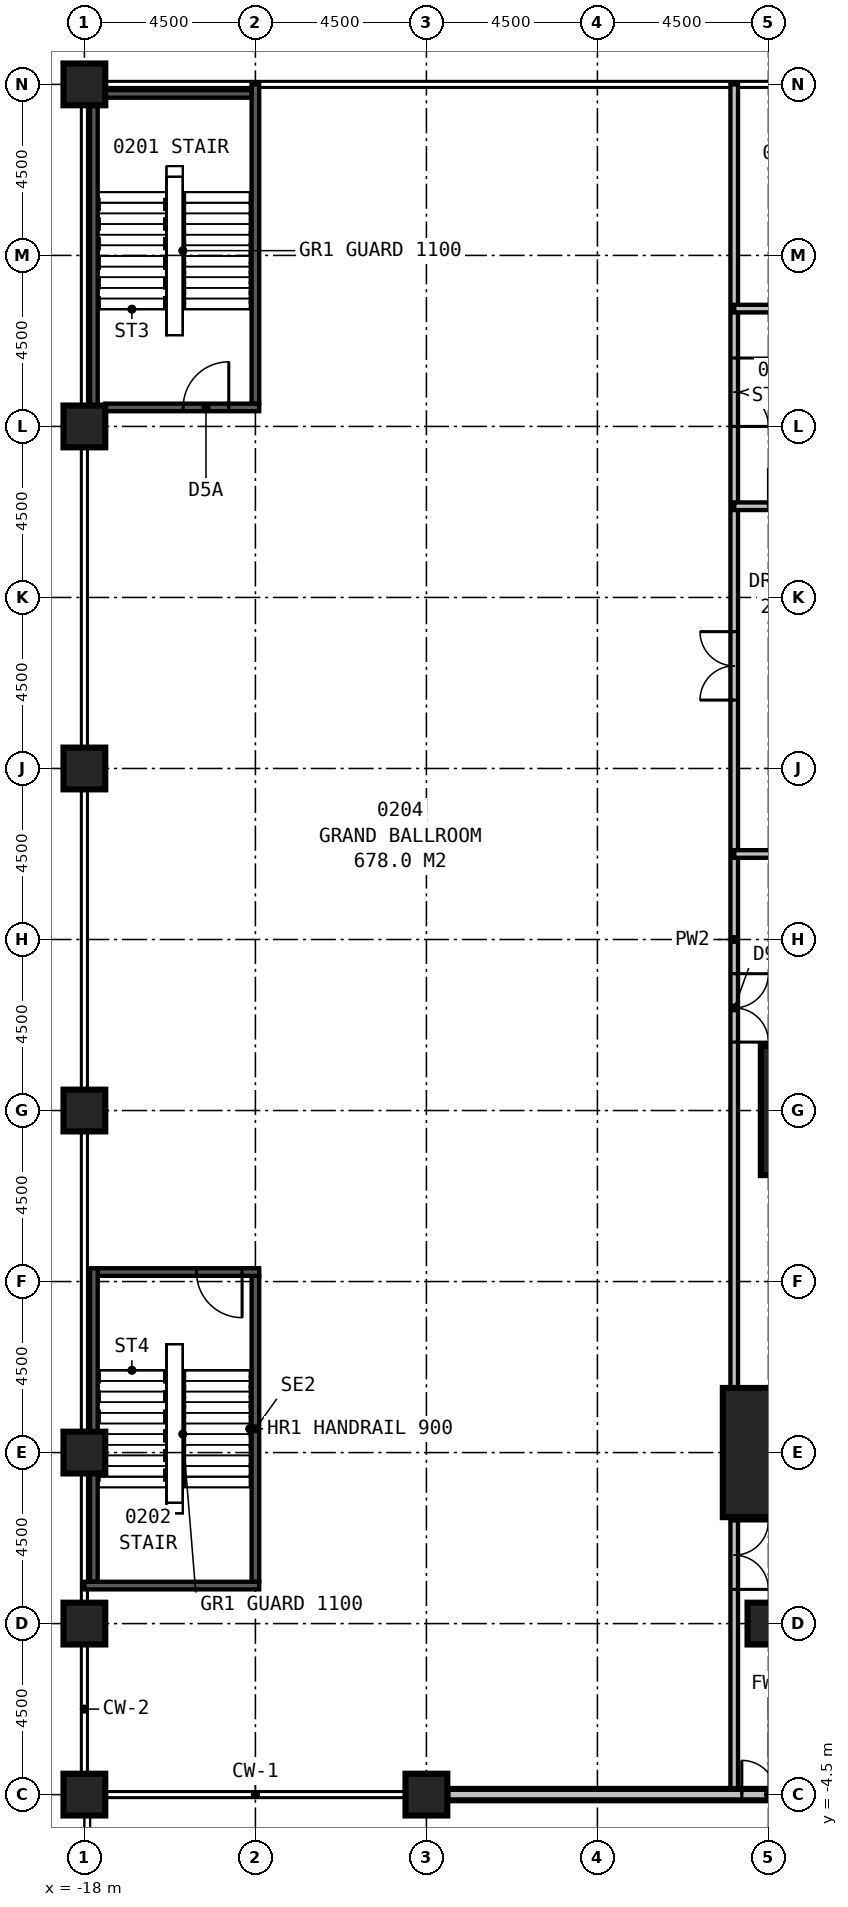
"""IFC4 building model, lengths in metres.
Left out: names, types, materials, properties, quantities, classifications, styles, units other than length and angle.
Written with IfcOpenShell. Run it as: python <this file> out.ifc"""

import sys

from ifc_helpers import new_model, si_unit, direction, frame, frame_2d, origin, origin_2d, place, context, subcontext, project, spatial, rectangle, extrude, element, fill, save


model = new_model("IFC4")
c1 = context("Model", 3, precision=1e-05, world=origin(), true_north=direction((0.0, 1.0)))
c2 = subcontext(c1, "Body", "Model", "MODEL_VIEW")
j1 = project(units=[si_unit("LENGTHUNIT", "METRE"), si_unit("PLANEANGLEUNIT", "RADIAN")], contexts=[c1])
p1 = place(None, origin())
s1 = spatial("IfcSite", under=j1, at=p1, CompositionType="ELEMENT")
p2 = place(p1, origin())
s2 = spatial("IfcBuilding", under=s1, at=p2, CompositionType="ELEMENT")
p3 = place(p2, frame((0.0, 0.0, 11.0)))
s3 = spatial("IfcBuildingStorey", under=s2, at=p3, CompositionType="ELEMENT", Elevation=11.0)
for number, where, z_axis, x_axis in (
    (1, (0.5, 4.5, 0.0), (0.0, 0.0, 1.0), (1.0, 0.0, 0.0)),
    (2, (1.5, 13.5, 0.0), (0.0, 0.0, 1.0), (1.0, 0.0, 0.0)),
):
    element("IfcColumn", number, at=place(p3, frame(where, z_axis=z_axis, x_axis=x_axis)), inside=s3, PredefinedType="COLUMN", context=c2, shape_type="SweptSolid", body=[
        extrude(rectangle(XDim=3.4, YDim=3.4, at=origin_2d()), origin(), (0.0, 0.0, 1.0), 8.0),
    ])
for number, where, z_axis, x_axis in (
    (3, (-18.0, -4.5, 0.0), (0.0, 0.0, 1.0), (1.0, 0.0, 0.0)),
    (4, (-18.0, 4.5, 0.0), (0.0, 0.0, 1.0), (1.0, 0.0, 0.0)),
    (5, (-18.0, 13.5, 0.0), (0.0, 0.0, 1.0), (1.0, 0.0, 0.0)),
    (6, (-18.0, 22.5, 0.0), (0.0, 0.0, 1.0), (1.0, 0.0, 0.0)),
    (7, (-18.0, 31.5, 0.0), (0.0, 0.0, 1.0), (1.0, 0.0, 0.0)),
    (8, (-18.0, 40.5, 0.0), (0.0, 0.0, 1.0), (1.0, 0.0, 0.0)),
    (9, (-18.0, 0.0, 0.0), (0.0, 0.0, 1.0), (1.0, 0.0, 0.0)),
    (10, (0.0, 0.0, 0.0), (0.0, 0.0, 1.0), (1.0, 0.0, 0.0)),
    (11, (-9.0, -4.5, 0.0), (0.0, 0.0, 1.0), (1.0, 0.0, 0.0)),
):
    element("IfcColumn", number, at=place(p3, frame(where, z_axis=z_axis, x_axis=x_axis)), inside=s3, PredefinedType="COLUMN", context=c2, shape_type="SweptSolid", body=[
        extrude(rectangle(XDim=1.1, YDim=1.1, at=origin_2d()), origin(), (0.0, 0.0, 1.0), 8.0),
    ])
p4 = place(p3, frame((-8.45, -4.5, 0.0), z_axis=(0.0, 0.0, 1.0), x_axis=(1.0, 0.0, 0.0)))
e12 = element("IfcWall", 12, at=p4, inside=s3, PredefinedType="STANDARD", context=c2, shape_type="SweptSolid", body=[
    extrude(rectangle(XDim=16.9, YDim=0.3, at=frame_2d((8.45, 0.0))), origin(), (0.0, 0.0, 1.0), 6.2),
])
p5 = place(p4, frame((7.75, 0.0, 0.0)))
e13 = element("IfcOpeningElement", 13, at=p5, cuts=e12, PredefinedType="OPENING", context=c2, shape_type="SweptSolid", body=[
    extrude(rectangle(XDim=1.8, YDim=2.4, at=frame_2d((0.9, 1.2))), frame((0.0, 0.16, 0.0), z_axis=(0.0, -1.0, 0.0), x_axis=(1.0, 0.0, 0.0)), (0.0, 0.0, 1.0), 0.32),
])
p6 = place(p3, frame((-17.45, 32.0, 0.0), z_axis=(0.0, 0.0, 1.0), x_axis=(1.0, 0.0, 0.0)))
e14 = element("IfcWall", 14, at=p6, inside=s3, PredefinedType="SOLIDWALL", context=c2, shape_type="SweptSolid", body=[
    extrude(rectangle(XDim=4.05, YDim=0.2, at=frame_2d((2.025, 0.0))), origin(), (0.0, 0.0, 1.0), 7.7),
])
p7 = place(p6, frame((2.05, 0.0, 0.0)))
e15 = element("IfcOpeningElement", 15, at=p7, cuts=e14, PredefinedType="OPENING", context=c2, shape_type="SweptSolid", body=[
    extrude(rectangle(XDim=1.2, YDim=2.1, at=frame_2d((0.6, 1.05))), frame((0.0, 0.11, 0.0), z_axis=(0.0, -1.0, 0.0), x_axis=(1.0, 0.0, 0.0)), (0.0, 0.0, 1.0), 0.22),
])
p8 = place(p3, frame((-13.5, 32.1, 0.0), z_axis=(0.0, 0.0, 1.0), x_axis=(0.0, 1.0, 0.0)))
e16 = element("IfcWall", 16, at=p8, inside=s3, PredefinedType="SOLIDWALL", context=c2, shape_type="SweptSolid", body=[
    extrude(rectangle(XDim=8.4, YDim=0.2, at=frame_2d((4.2, 0.0))), origin(), (0.0, 0.0, 1.0), 7.7),
])
p9 = place(p3, frame((-17.65, 9.25, 0.0), z_axis=(0.0, 0.0, 1.0), x_axis=(1.0, 0.0, 0.0)))
e17 = element("IfcWall", 17, at=p9, inside=s3, PredefinedType="SOLIDWALL", context=c2, shape_type="SweptSolid", body=[
    extrude(rectangle(XDim=4.25, YDim=0.2, at=frame_2d((2.125, 0.0))), origin(), (0.0, 0.0, 1.0), 7.7),
])
p10 = place(p9, frame((3.8, 0.0, 0.0), z_axis=(0.0, 0.0, 1.0), x_axis=(-1.0, 0.0, 0.0)))
e18 = element("IfcOpeningElement", 18, at=p10, cuts=e17, PredefinedType="OPENING", context=c2, shape_type="SweptSolid", body=[
    extrude(rectangle(XDim=1.2, YDim=2.1, at=frame_2d((0.6, 1.05))), frame((0.0, 0.11, 0.0), z_axis=(0.0, -1.0, 0.0), x_axis=(1.0, 0.0, 0.0)), (0.0, 0.0, 1.0), 0.22),
])
p11 = place(p3, frame((-18.0, 1.0, 0.0), z_axis=(0.0, 0.0, 1.0), x_axis=(1.0, 0.0, 0.0)))
e19 = element("IfcWall", 19, at=p11, inside=s3, PredefinedType="SOLIDWALL", context=c2, shape_type="SweptSolid", body=[
    extrude(rectangle(XDim=4.6, YDim=0.2, at=frame_2d((2.3, 0.0))), origin(), (0.0, 0.0, 1.0), 7.7),
])
p12 = place(p3, frame((-13.5, 1.1, 0.0), z_axis=(0.0, 0.0, 1.0), x_axis=(0.0, 1.0, 0.0)))
e20 = element("IfcWall", 20, at=p12, inside=s3, PredefinedType="SOLIDWALL", context=c2, shape_type="SweptSolid", body=[
    extrude(rectangle(XDim=8.05, YDim=0.2, at=frame_2d((4.025, 0.0))), origin(), (0.0, 0.0, 1.0), 7.7),
])
p13 = place(p3, frame((-17.75, 32.05, 0.0), z_axis=(0.0, 0.0, 1.0), x_axis=(0.0, 1.0, 0.0)))
e21 = element("IfcWall", 21, at=p13, inside=s3, PredefinedType="SOLIDWALL", context=c2, shape_type="SweptSolid", body=[
    extrude(rectangle(XDim=7.9, YDim=0.2, at=frame_2d((3.95, 0.0))), origin(), (0.0, 0.0, 1.0), 7.7),
])
p14 = place(p3, frame((-17.45, 40.25, 0.0), z_axis=(0.0, 0.0, 1.0), x_axis=(1.0, 0.0, 0.0)))
e22 = element("IfcWall", 22, at=p14, inside=s3, PredefinedType="SOLIDWALL", context=c2, shape_type="SweptSolid", body=[
    extrude(rectangle(XDim=3.85, YDim=0.2, at=frame_2d((1.925, 0.0))), origin(), (0.0, 0.0, 1.0), 7.7),
])
p15 = place(p3, frame((-17.75, 1.1, 0.0), z_axis=(0.0, 0.0, 1.0), x_axis=(0.0, 1.0, 0.0)))
e23 = element("IfcWall", 23, at=p15, inside=s3, PredefinedType="SOLIDWALL", context=c2, shape_type="SweptSolid", body=[
    extrude(rectangle(XDim=2.85, YDim=0.2, at=frame_2d((1.425, 0.0))), origin(), (0.0, 0.0, 1.0), 7.7),
])
p16 = place(p3, frame((-17.75, 5.05, 0.0), z_axis=(0.0, 0.0, 1.0), x_axis=(0.0, 1.0, 0.0)))
e24 = element("IfcWall", 24, at=p16, inside=s3, PredefinedType="SOLIDWALL", context=c2, shape_type="SweptSolid", body=[
    extrude(rectangle(XDim=4.3, YDim=0.2, at=frame_2d((2.15, 0.0))), origin(), (0.0, 0.0, 1.0), 7.7),
])
p17 = place(p3, frame((-0.9, -4.5, 0.0), z_axis=(0.0, 0.0, 1.0), x_axis=(0.0, 1.0, 0.0)))
e25 = element("IfcWall", 25, at=p17, inside=s3, PredefinedType="PARTITIONING", context=c2, shape_type="SweptSolid", body=[
    extrude(rectangle(XDim=45.0, YDim=0.2, at=frame_2d((22.5, 0.0))), origin(), (0.0, 0.0, 1.0), 7.7),
])
p18 = place(p17, frame((7.2, 0.0, 0.0), z_axis=(0.0, 0.0, 1.0), x_axis=(-1.0, 0.0, 0.0)))
e26 = element("IfcOpeningElement", 26, at=p18, cuts=e25, PredefinedType="OPENING", context=c2, shape_type="SweptSolid", body=[
    extrude(rectangle(XDim=1.8, YDim=2.4, at=frame_2d((0.9, 1.2))), frame((0.0, 0.11, 0.0), z_axis=(0.0, -1.0, 0.0), x_axis=(1.0, 0.0, 0.0)), (0.0, 0.0, 1.0), 0.22),
])
p19 = place(p17, frame((21.6, 0.0, 0.0), z_axis=(0.0, 0.0, 1.0), x_axis=(-1.0, 0.0, 0.0)))
e27 = element("IfcOpeningElement", 27, at=p19, cuts=e25, PredefinedType="OPENING", context=c2, shape_type="SweptSolid", body=[
    extrude(rectangle(XDim=1.8, YDim=2.4, at=frame_2d((0.9, 1.2))), frame((0.0, 0.11, 0.0), z_axis=(0.0, -1.0, 0.0), x_axis=(1.0, 0.0, 0.0)), (0.0, 0.0, 1.0), 0.22),
])
p20 = place(p17, frame((28.8, 0.0, 0.0)))
e28 = element("IfcOpeningElement", 28, at=p20, cuts=e25, PredefinedType="OPENING", context=c2, shape_type="SweptSolid", body=[
    extrude(rectangle(XDim=1.8, YDim=2.4, at=frame_2d((0.9, 1.2))), frame((0.0, 0.11, 0.0), z_axis=(0.0, -1.0, 0.0), x_axis=(1.0, 0.0, 0.0)), (0.0, 0.0, 1.0), 0.22),
])
p21 = place(p17, frame((37.8, 0.0, 0.0), z_axis=(0.0, 0.0, 1.0), x_axis=(-1.0, 0.0, 0.0)))
e29 = element("IfcOpeningElement", 29, at=p21, cuts=e25, PredefinedType="OPENING", context=c2, shape_type="SweptSolid", body=[
    extrude(rectangle(XDim=1.8, YDim=2.4, at=frame_2d((0.9, 1.2))), frame((0.0, 0.11, 0.0), z_axis=(0.0, -1.0, 0.0), x_axis=(1.0, 0.0, 0.0)), (0.0, 0.0, 1.0), 0.22),
])
p22 = place(p3, frame((-0.9, 20.25, 0.0), z_axis=(0.0, 0.0, 1.0), x_axis=(1.0, 0.0, 0.0)))
e30 = element("IfcWall", 30, at=p22, inside=s3, PredefinedType="PARTITIONING", context=c2, shape_type="SweptSolid", body=[
    extrude(rectangle(XDim=14.1, YDim=0.2, at=frame_2d((7.05, 0.0))), origin(), (0.0, 0.0, 1.0), 7.7),
])
p23 = place(p22, frame((7.7, 0.0, 0.0), z_axis=(0.0, 0.0, 1.0), x_axis=(-1.0, 0.0, 0.0)))
e31 = element("IfcOpeningElement", 31, at=p23, cuts=e30, PredefinedType="OPENING", context=c2, shape_type="SweptSolid", body=[
    extrude(rectangle(XDim=1.8, YDim=2.4, at=frame_2d((0.9, 1.2))), frame((0.0, 0.11, 0.0), z_axis=(0.0, -1.0, 0.0), x_axis=(1.0, 0.0, 0.0)), (0.0, 0.0, 1.0), 0.22),
])
p24 = place(p3, frame((-0.9, 29.4, 0.0), z_axis=(0.0, 0.0, 1.0), x_axis=(1.0, 0.0, 0.0)))
e32 = element("IfcWall", 32, at=p24, inside=s3, PredefinedType="PARTITIONING", context=c2, shape_type="SweptSolid", body=[
    extrude(rectangle(XDim=14.4, YDim=0.2, at=frame_2d((7.2, 0.0))), origin(), (0.0, 0.0, 1.0), 7.7),
])
p25 = place(p24, frame((7.1, 0.0, 0.0)))
e33 = element("IfcOpeningElement", 33, at=p25, cuts=e32, PredefinedType="OPENING", context=c2, shape_type="SweptSolid", body=[
    extrude(rectangle(XDim=1.0, YDim=2.1, at=frame_2d((0.5, 1.05))), frame((0.0, 0.11, 0.0), z_axis=(0.0, -1.0, 0.0), x_axis=(1.0, 0.0, 0.0)), (0.0, 0.0, 1.0), 0.22),
])
p26 = place(p24, frame((0.9, 0.0, 0.0)))
e34 = element("IfcOpeningElement", 34, at=p26, cuts=e32, PredefinedType="OPENING", context=c2, shape_type="SweptSolid", body=[
    extrude(rectangle(XDim=1.0, YDim=2.1, at=frame_2d((0.5, 1.05))), frame((0.0, 0.11, 0.0), z_axis=(0.0, -1.0, 0.0), x_axis=(1.0, 0.0, 0.0)), (0.0, 0.0, 1.0), 0.22),
])
p27 = place(p24, frame((10.9, 0.0, 0.0)))
e35 = element("IfcOpeningElement", 35, at=p27, cuts=e32, PredefinedType="OPENING", context=c2, shape_type="SweptSolid", body=[
    extrude(rectangle(XDim=1.2, YDim=2.1, at=frame_2d((0.6, 1.05))), frame((0.0, 0.11, 0.0), z_axis=(0.0, -1.0, 0.0), x_axis=(1.0, 0.0, 0.0)), (0.0, 0.0, 1.0), 0.22),
])
p28 = place(p3, frame((-0.9, 34.6, 0.0), z_axis=(0.0, 0.0, 1.0), x_axis=(1.0, 0.0, 0.0)))
e36 = element("IfcWall", 36, at=p28, inside=s3, PredefinedType="PARTITIONING", context=c2, shape_type="SweptSolid", body=[
    extrude(rectangle(XDim=14.4, YDim=0.2, at=frame_2d((7.2, 0.0))), origin(), (0.0, 0.0, 1.0), 7.7),
])
p29 = place(p5, origin())
e37 = element("IfcDoor", 37, at=p29, inside=s3, OperationType="DOUBLE_DOOR_SINGLE_SWING", PredefinedType="DOOR", context=c2, shape_type="SweptSolid", body=[
    extrude(rectangle(XDim=1.8, YDim=2.4, at=frame_2d((0.9, 1.2))), frame((0.0, 0.025, 0.0), z_axis=(0.0, -1.0, 0.0), x_axis=(1.0, 0.0, 0.0)), (0.0, 0.0, 1.0), 0.05),
])
fill(e13, e37)
p30 = place(p7, origin())
e38 = element("IfcDoor", 38, at=p30, inside=s3, OperationType="SINGLE_SWING_RIGHT", PredefinedType="DOOR", context=c2, shape_type="SweptSolid", body=[
    extrude(rectangle(XDim=1.2, YDim=2.1, at=frame_2d((0.6, 1.05))), frame((0.0, 0.025, 0.0), z_axis=(0.0, -1.0, 0.0), x_axis=(1.0, 0.0, 0.0)), (0.0, 0.0, 1.0), 0.05),
])
fill(e15, e38)
p31 = place(p10, origin())
e39 = element("IfcDoor", 39, at=p31, inside=s3, OperationType="SINGLE_SWING_LEFT", PredefinedType="DOOR", context=c2, shape_type="SweptSolid", body=[
    extrude(rectangle(XDim=1.2, YDim=2.1, at=frame_2d((0.6, 1.05))), frame((0.0, 0.025, 0.0), z_axis=(0.0, -1.0, 0.0), x_axis=(1.0, 0.0, 0.0)), (0.0, 0.0, 1.0), 0.05),
])
fill(e18, e39)
p32 = place(p18, origin())
e40 = element("IfcDoor", 40, at=p32, inside=s3, OperationType="DOUBLE_DOOR_SINGLE_SWING", PredefinedType="DOOR", context=c2, shape_type="SweptSolid", body=[
    extrude(rectangle(XDim=1.8, YDim=2.4, at=frame_2d((0.9, 1.2))), frame((0.0, 0.025, 0.0), z_axis=(0.0, -1.0, 0.0), x_axis=(1.0, 0.0, 0.0)), (0.0, 0.0, 1.0), 0.05),
])
fill(e26, e40)
p33 = place(p19, origin())
e41 = element("IfcDoor", 41, at=p33, inside=s3, OperationType="DOUBLE_DOOR_SINGLE_SWING", PredefinedType="DOOR", context=c2, shape_type="SweptSolid", body=[
    extrude(rectangle(XDim=1.8, YDim=2.4, at=frame_2d((0.9, 1.2))), frame((0.0, 0.025, 0.0), z_axis=(0.0, -1.0, 0.0), x_axis=(1.0, 0.0, 0.0)), (0.0, 0.0, 1.0), 0.05),
])
fill(e27, e41)
p34 = place(p20, origin())
e42 = element("IfcDoor", 42, at=p34, inside=s3, OperationType="DOUBLE_DOOR_SINGLE_SWING", PredefinedType="DOOR", context=c2, shape_type="SweptSolid", body=[
    extrude(rectangle(XDim=1.8, YDim=2.4, at=frame_2d((0.9, 1.2))), frame((0.0, 0.025, 0.0), z_axis=(0.0, -1.0, 0.0), x_axis=(1.0, 0.0, 0.0)), (0.0, 0.0, 1.0), 0.05),
])
fill(e28, e42)
p35 = place(p21, origin())
e43 = element("IfcDoor", 43, at=p35, inside=s3, OperationType="DOUBLE_DOOR_SINGLE_SWING", PredefinedType="DOOR", context=c2, shape_type="SweptSolid", body=[
    extrude(rectangle(XDim=1.8, YDim=2.4, at=frame_2d((0.9, 1.2))), frame((0.0, 0.025, 0.0), z_axis=(0.0, -1.0, 0.0), x_axis=(1.0, 0.0, 0.0)), (0.0, 0.0, 1.0), 0.05),
])
fill(e29, e43)
save(model, sys.argv[1])
